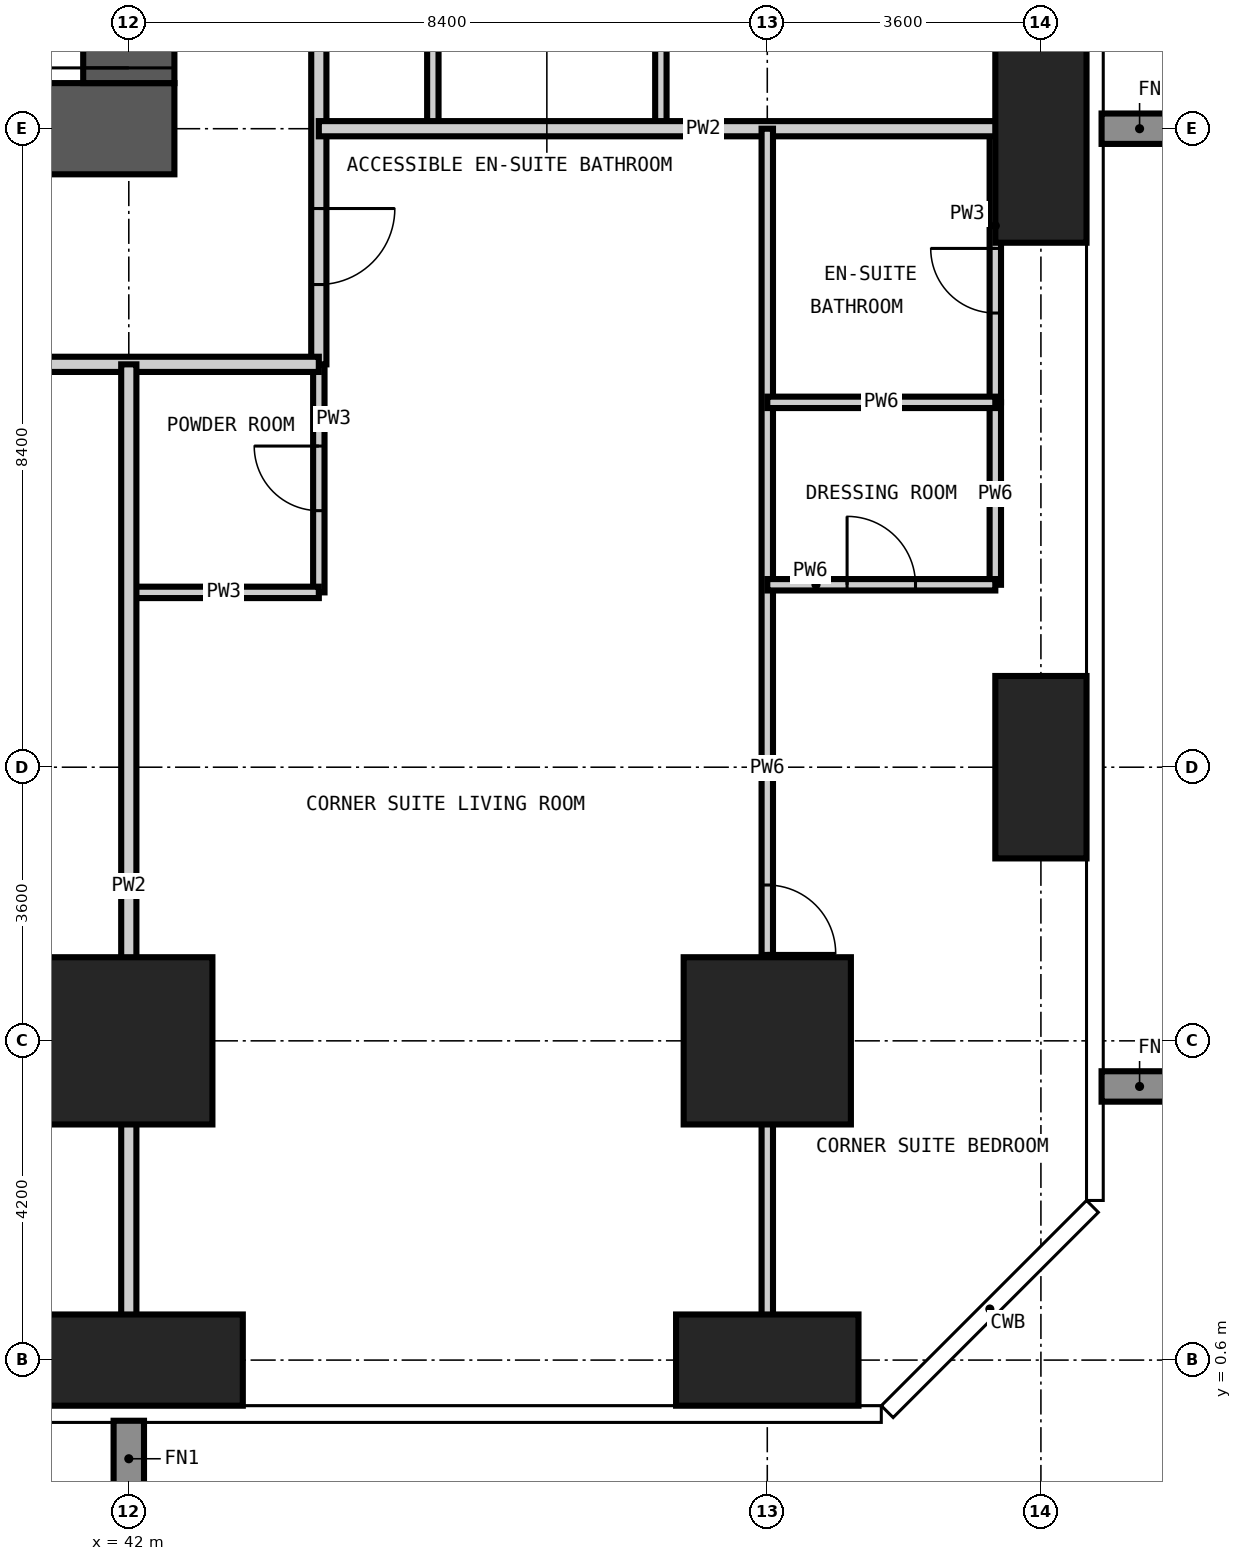
"""IFC4 building model, lengths in metres.
Left out: names, types, materials, properties, quantities, classifications, styles, units other than length and angle.
Written with IfcOpenShell. Run it as: python <this file> out.ifc"""

import sys

from ifc_helpers import new_model, si_unit, direction, frame, frame_2d, origin, origin_2d, place, context, subcontext, project, spatial, rectangle, extrude, element, fill, save


model = new_model("IFC4")
c1 = context("Model", 3, precision=1e-05, world=origin(), true_north=direction((0.0, 1.0)))
c2 = subcontext(c1, "Body", "Model", "MODEL_VIEW")
j1 = project(units=[si_unit("LENGTHUNIT", "METRE"), si_unit("PLANEANGLEUNIT", "RADIAN")], contexts=[c1])
p1 = place(None, origin())
s1 = spatial("IfcSite", under=j1, at=p1, CompositionType="ELEMENT")
p2 = place(p1, origin())
s2 = spatial("IfcBuilding", under=s1, at=p2, CompositionType="ELEMENT")
p3 = place(p2, frame((0.0, 0.0, 97.2)))
s3 = spatial("IfcBuildingStorey", under=s2, at=p3, CompositionType="ELEMENT", Elevation=97.2)
p4 = place(p3, frame((42.0, 0.6, -0.35), z_axis=(0.0, 0.0, 1.0), x_axis=(1.0, 0.0, 0.0)))
e1 = element("IfcColumn", 1, at=p4, inside=s3, PredefinedType="COLUMN", context=c2, shape_type="SweptSolid", body=[
    extrude(rectangle(XDim=3.0, YDim=1.2, at=origin_2d()), origin(), (0.0, 0.0, 1.0), 3.6),
])
p5 = place(p3, frame((42.0, 4.8, -0.35), z_axis=(0.0, 0.0, 1.0), x_axis=(1.0, 0.0, 0.0)))
e2 = element("IfcColumn", 2, at=p5, inside=s3, PredefinedType="COLUMN", context=c2, shape_type="SweptSolid", body=[
    extrude(rectangle(XDim=2.2, YDim=2.2, at=origin_2d()), origin(), (0.0, 0.0, 1.0), 3.6),
])
p6 = place(p3, frame((50.4, 0.6, -0.35), z_axis=(0.0, 0.0, 1.0), x_axis=(1.0, 0.0, 0.0)))
e3 = element("IfcColumn", 3, at=p6, inside=s3, PredefinedType="COLUMN", context=c2, shape_type="SweptSolid", body=[
    extrude(rectangle(XDim=2.4, YDim=1.2, at=origin_2d()), origin(), (0.0, 0.0, 1.0), 3.6),
])
p7 = place(p3, frame((50.4, 4.8, -0.35), z_axis=(0.0, 0.0, 1.0), x_axis=(1.0, 0.0, 0.0)))
e4 = element("IfcColumn", 4, at=p7, inside=s3, PredefinedType="COLUMN", context=c2, shape_type="SweptSolid", body=[
    extrude(rectangle(XDim=2.2, YDim=2.2, at=origin_2d()), origin(), (0.0, 0.0, 1.0), 3.6),
])
p8 = place(p3, frame((54.0, 8.4, -0.35), z_axis=(0.0, 0.0, 1.0), x_axis=(1.0, 0.0, 0.0)))
e5 = element("IfcColumn", 5, at=p8, inside=s3, PredefinedType="COLUMN", context=c2, shape_type="SweptSolid", body=[
    extrude(rectangle(XDim=1.2, YDim=2.4, at=origin_2d()), origin(), (0.0, 0.0, 1.0), 3.6),
])
p9 = place(p3, frame((54.0, 16.8, -0.35), z_axis=(0.0, 0.0, 1.0), x_axis=(1.0, 0.0, 0.0)))
e6 = element("IfcColumn", 6, at=p9, inside=s3, PredefinedType="COLUMN", context=c2, shape_type="SweptSolid", body=[
    extrude(rectangle(XDim=1.2, YDim=3.0, at=origin_2d()), origin(), (0.0, 0.0, 1.0), 3.6),
])
p10 = place(p3, frame((16.2, 16.8, -0.35), z_axis=(0.0, 0.0, 1.0), x_axis=(1.0, 0.0, 0.0)))
e7 = element("IfcWall", 7, at=p10, inside=s3, PredefinedType="SHEAR", context=c2, shape_type="SweptSolid", body=[
    extrude(rectangle(XDim=26.4, YDim=1.2, at=frame_2d((13.2, 0.0))), origin(), (0.0, 0.0, 1.0), 3.6),
])
p11 = place(p10, frame((12.7, 0.0, 0.35)))
e8 = element("IfcOpeningElement", 8, at=p11, cuts=e7, PredefinedType="OPENING", context=c2, shape_type="SweptSolid", body=[
    extrude(rectangle(XDim=1.0, YDim=2.1, at=frame_2d((0.5, 1.05))), frame((0.0, 0.61, 0.0), z_axis=(0.0, -1.0, 0.0), x_axis=(1.0, 0.0, 0.0)), (0.0, 0.0, 1.0), 1.22),
])
p12 = place(p10, frame((19.0, 0.0, 0.35)))
e9 = element("IfcOpeningElement", 9, at=p12, cuts=e7, PredefinedType="OPENING", context=c2, shape_type="SweptSolid", body=[
    extrude(rectangle(XDim=1.0, YDim=2.1, at=frame_2d((0.5, 1.05))), frame((0.0, 0.61, 0.0), z_axis=(0.0, -1.0, 0.0), x_axis=(1.0, 0.0, 0.0)), (0.0, 0.0, 1.0), 1.22),
])
p13 = place(p3, frame((42.0, 17.4, -0.35), z_axis=(0.0, 0.0, 1.0), x_axis=(0.0, 1.0, 0.0)))
e10 = element("IfcWall", 10, at=p13, inside=s3, PredefinedType="SHEAR", context=c2, shape_type="SweptSolid", body=[
    extrude(rectangle(XDim=24.0, YDim=1.2, at=frame_2d((12.0, 0.0))), origin(), (0.0, 0.0, 1.0), 3.6),
])
p14 = place(p13, frame((0.2, 0.0, 0.35)))
e11 = element("IfcOpeningElement", 11, at=p14, cuts=e10, PredefinedType="OPENING", context=c2, shape_type="SweptSolid", body=[
    extrude(rectangle(XDim=1.2, YDim=2.2, at=frame_2d((0.6, 1.1))), frame((0.0, 0.61, 0.0), z_axis=(0.0, -1.0, 0.0), x_axis=(1.0, 0.0, 0.0)), (0.0, 0.0, 1.0), 1.22),
])
p15 = place(p13, frame((11.1, 0.0, 0.35)))
e12 = element("IfcOpeningElement", 12, at=p15, cuts=e10, PredefinedType="OPENING", context=c2, shape_type="SweptSolid", body=[
    extrude(rectangle(XDim=1.8, YDim=2.2, at=frame_2d((0.9, 1.1))), frame((0.0, 0.61, 0.0), z_axis=(0.0, -1.0, 0.0), x_axis=(1.0, 0.0, 0.0)), (0.0, 0.0, 1.0), 1.22),
])
p16 = place(p13, frame((19.9, 0.0, 0.35)))
e13 = element("IfcOpeningElement", 13, at=p16, cuts=e10, PredefinedType="OPENING", context=c2, shape_type="SweptSolid", body=[
    extrude(rectangle(XDim=1.0, YDim=2.1, at=frame_2d((0.5, 1.05))), frame((0.0, 0.61, 0.0), z_axis=(0.0, -1.0, 0.0), x_axis=(1.0, 0.0, 0.0)), (0.0, 0.0, 1.0), 1.22),
])
p17 = place(p3, frame((44.5, 10.7, 0.0), z_axis=(0.0, 0.0, 1.0), x_axis=(0.0, 1.0, 0.0)))
e14 = element("IfcWall", 14, at=p17, inside=s3, PredefinedType="PARTITIONING", context=c2, shape_type="SweptSolid", body=[
    extrude(rectangle(XDim=3.0, YDim=0.15, at=frame_2d((1.5, 0.0))), origin(), (0.0, 0.0, 1.0), 3.25),
])
p18 = place(p17, frame((1.075, 0.0, 0.0)))
e15 = element("IfcOpeningElement", 15, at=p18, cuts=e14, PredefinedType="OPENING", context=c2, shape_type="SweptSolid", body=[
    extrude(rectangle(XDim=0.85, YDim=2.1, at=frame_2d((0.425, 1.05))), frame((0.0, 0.085, 0.0), z_axis=(0.0, -1.0, 0.0), x_axis=(1.0, 0.0, 0.0)), (0.0, 0.0, 1.0), 0.17),
])
for number, where, z_axis, x_axis in (
    (16, (46.0, 16.8, 0.0), (0.0, 0.0, 1.0), (0.0, 1.0, 0.0)),
    (17, (49.0, 16.8, 0.0), (0.0, 0.0, 1.0), (0.0, 1.0, 0.0)),
):
    element("IfcWall", number, at=place(p3, frame(where, z_axis=z_axis, x_axis=x_axis)), inside=s3, PredefinedType="PARTITIONING", context=c2, shape_type="SweptSolid", body=[
        extrude(rectangle(XDim=2.7, YDim=0.15, at=frame_2d((1.35, 0.0))), origin(), (0.0, 0.0, 1.0), 3.25),
    ])
p19 = place(p3, frame((53.4, 13.2, 0.0), z_axis=(0.0, 0.0, 1.0), x_axis=(0.0, 1.0, 0.0)))
e18 = element("IfcWall", 18, at=p19, inside=s3, PredefinedType="PARTITIONING", context=c2, shape_type="SweptSolid", body=[
    extrude(rectangle(XDim=3.6, YDim=0.15, at=frame_2d((1.8, 0.0))), origin(), (0.0, 0.0, 1.0), 3.25),
])
p20 = place(p19, frame((1.175, 0.0, 0.0)))
e19 = element("IfcOpeningElement", 19, at=p20, cuts=e18, PredefinedType="OPENING", context=c2, shape_type="SweptSolid", body=[
    extrude(rectangle(XDim=0.85, YDim=2.1, at=frame_2d((0.425, 1.05))), frame((0.0, 0.085, 0.0), z_axis=(0.0, -1.0, 0.0), x_axis=(1.0, 0.0, 0.0)), (0.0, 0.0, 1.0), 0.17),
])
p21 = place(p3, frame((42.0, 10.7, 0.0), z_axis=(0.0, 0.0, 1.0), x_axis=(1.0, 0.0, 0.0)))
e20 = element("IfcWall", 20, at=p21, inside=s3, PredefinedType="PARTITIONING", context=c2, shape_type="SweptSolid", body=[
    extrude(rectangle(XDim=2.5, YDim=0.15, at=frame_2d((1.25, 0.0))), origin(), (0.0, 0.0, 1.0), 3.25),
])
p22 = place(p3, frame((44.5, 45.7, 0.0), z_axis=(0.0, 0.0, 1.0), x_axis=(0.0, -1.0, 0.0)))
e21 = element("IfcWall", 21, at=p22, inside=s3, PredefinedType="PARTITIONING", context=c2, shape_type="SweptSolid", body=[
    extrude(rectangle(XDim=32.0, YDim=0.2, at=frame_2d((16.0, 0.0))), origin(), (0.0, 0.0, 1.0), 3.25),
])
p23 = place(p22, frame((26.3, 0.0, 0.0)))
e22 = element("IfcOpeningElement", 22, at=p23, cuts=e21, PredefinedType="OPENING", context=c2, shape_type="SweptSolid", body=[
    extrude(rectangle(XDim=1.0, YDim=2.2, at=frame_2d((0.5, 1.1))), frame((0.0, 0.11, 0.0), z_axis=(0.0, -1.0, 0.0), x_axis=(1.0, 0.0, 0.0)), (0.0, 0.0, 1.0), 0.22),
])
p24 = place(p22, frame((20.0, 0.0, 0.0)))
e23 = element("IfcOpeningElement", 23, at=p24, cuts=e21, PredefinedType="OPENING", context=c2, shape_type="SweptSolid", body=[
    extrude(rectangle(XDim=1.0, YDim=2.2, at=frame_2d((0.5, 1.1))), frame((0.0, 0.11, 0.0), z_axis=(0.0, -1.0, 0.0), x_axis=(1.0, 0.0, 0.0)), (0.0, 0.0, 1.0), 0.22),
])
p25 = place(p22, frame((11.6, 0.0, 0.0)))
e24 = element("IfcOpeningElement", 24, at=p25, cuts=e21, PredefinedType="OPENING", context=c2, shape_type="SweptSolid", body=[
    extrude(rectangle(XDim=1.0, YDim=2.2, at=frame_2d((0.5, 1.1))), frame((0.0, 0.11, 0.0), z_axis=(0.0, -1.0, 0.0), x_axis=(1.0, 0.0, 0.0)), (0.0, 0.0, 1.0), 0.22),
])
p26 = place(p22, frame((5.3, 0.0, 0.0)))
e25 = element("IfcOpeningElement", 25, at=p26, cuts=e21, PredefinedType="OPENING", context=c2, shape_type="SweptSolid", body=[
    extrude(rectangle(XDim=1.0, YDim=2.2, at=frame_2d((0.5, 1.1))), frame((0.0, 0.11, 0.0), z_axis=(0.0, -1.0, 0.0), x_axis=(1.0, 0.0, 0.0)), (0.0, 0.0, 1.0), 0.22),
])
p27 = place(p22, frame((29.95, 0.0, 0.0)))
e26 = element("IfcOpeningElement", 26, at=p27, cuts=e21, PredefinedType="OPENING", context=c2, shape_type="SweptSolid", body=[
    extrude(rectangle(XDim=1.0, YDim=2.2, at=frame_2d((0.5, 1.1))), frame((0.0, 0.11, 0.0), z_axis=(0.0, -1.0, 0.0), x_axis=(1.0, 0.0, 0.0)), (0.0, 0.0, 1.0), 0.22),
])
p28 = place(p22, frame((1.35, 0.0, 0.0)))
e27 = element("IfcOpeningElement", 27, at=p28, cuts=e21, PredefinedType="OPENING", context=c2, shape_type="SweptSolid", body=[
    extrude(rectangle(XDim=1.0, YDim=2.2, at=frame_2d((0.5, 1.1))), frame((0.0, 0.11, 0.0), z_axis=(0.0, -1.0, 0.0), x_axis=(1.0, 0.0, 0.0)), (0.0, 0.0, 1.0), 0.22),
])
p29 = place(p3, frame((44.5, 13.7, 0.0), z_axis=(0.0, 0.0, 1.0), x_axis=(-1.0, 0.0, 0.0)))
e28 = element("IfcWall", 28, at=p29, inside=s3, PredefinedType="PARTITIONING", context=c2, shape_type="SweptSolid", body=[
    extrude(rectangle(XDim=31.9, YDim=0.2, at=frame_2d((15.95, 0.0))), origin(), (0.0, 0.0, 1.0), 3.25),
])
p30 = place(p29, frame((23.0, 0.0, 0.0)))
e29 = element("IfcOpeningElement", 29, at=p30, cuts=e28, PredefinedType="OPENING", context=c2, shape_type="SweptSolid", body=[
    extrude(rectangle(XDim=1.0, YDim=2.2, at=frame_2d((0.5, 1.1))), frame((0.0, 0.11, 0.0), z_axis=(0.0, -1.0, 0.0), x_axis=(1.0, 0.0, 0.0)), (0.0, 0.0, 1.0), 0.22),
])
p31 = place(p29, frame((14.6, 0.0, 0.0)))
e30 = element("IfcOpeningElement", 30, at=p31, cuts=e28, PredefinedType="OPENING", context=c2, shape_type="SweptSolid", body=[
    extrude(rectangle(XDim=1.0, YDim=2.2, at=frame_2d((0.5, 1.1))), frame((0.0, 0.11, 0.0), z_axis=(0.0, -1.0, 0.0), x_axis=(1.0, 0.0, 0.0)), (0.0, 0.0, 1.0), 0.22),
])
p32 = place(p29, frame((6.2, 0.0, 0.0)))
e31 = element("IfcOpeningElement", 31, at=p32, cuts=e28, PredefinedType="OPENING", context=c2, shape_type="SweptSolid", body=[
    extrude(rectangle(XDim=1.0, YDim=2.2, at=frame_2d((0.5, 1.1))), frame((0.0, 0.11, 0.0), z_axis=(0.0, -1.0, 0.0), x_axis=(1.0, 0.0, 0.0)), (0.0, 0.0, 1.0), 0.22),
])
p33 = place(p3, frame((42.0, -0.018, 0.0), z_axis=(0.0, 0.0, 1.0), x_axis=(0.0, 1.0, 0.0)))
e32 = element("IfcWall", 32, at=p33, inside=s3, PredefinedType="PARTITIONING", context=c2, shape_type="SweptSolid", body=[
    extrude(rectangle(XDim=13.718, YDim=0.2, at=frame_2d((6.859, 0.0))), origin(), (0.0, 0.0, 1.0), 3.25),
])
p34 = place(p3, frame((44.5, 16.8, 0.0), z_axis=(0.0, 0.0, 1.0), x_axis=(1.0, 0.0, 0.0)))
e33 = element("IfcWall", 33, at=p34, inside=s3, PredefinedType="PARTITIONING", context=c2, shape_type="SweptSolid", body=[
    extrude(rectangle(XDim=10.118, YDim=0.2, at=frame_2d((5.059, 0.0))), origin(), (0.0, 0.0, 1.0), 3.25),
])
p35 = place(p3, frame((50.4, -0.018, 0.0), z_axis=(0.0, 0.0, 1.0), x_axis=(0.0, 1.0, 0.0)))
e34 = element("IfcWall", 34, at=p35, inside=s3, PredefinedType="PARTITIONING", context=c2, shape_type="SweptSolid", body=[
    extrude(rectangle(XDim=16.818, YDim=0.15, at=frame_2d((8.409, 0.0))), origin(), (0.0, 0.0, 1.0), 3.25),
])
p36 = place(p35, frame((5.968, 0.0, 0.0)))
e35 = element("IfcOpeningElement", 35, at=p36, cuts=e34, PredefinedType="OPENING", context=c2, shape_type="SweptSolid", body=[
    extrude(rectangle(XDim=0.9, YDim=2.1, at=frame_2d((0.45, 1.05))), frame((0.0, 0.085, 0.0), z_axis=(0.0, -1.0, 0.0), x_axis=(1.0, 0.0, 0.0)), (0.0, 0.0, 1.0), 0.17),
])
p37 = place(p3, frame((53.4, 10.8, 0.0), z_axis=(0.0, 0.0, 1.0), x_axis=(0.0, 1.0, 0.0)))
e36 = element("IfcWall", 36, at=p37, inside=s3, PredefinedType="PARTITIONING", context=c2, shape_type="SweptSolid", body=[
    extrude(rectangle(XDim=2.4, YDim=0.15, at=frame_2d((1.2, 0.0))), origin(), (0.0, 0.0, 1.0), 3.25),
])
p38 = place(p3, frame((50.4, 10.8, 0.0), z_axis=(0.0, 0.0, 1.0), x_axis=(1.0, 0.0, 0.0)))
e37 = element("IfcWall", 37, at=p38, inside=s3, PredefinedType="PARTITIONING", context=c2, shape_type="SweptSolid", body=[
    extrude(rectangle(XDim=3.0, YDim=0.15, at=frame_2d((1.5, 0.0))), origin(), (0.0, 0.0, 1.0), 3.25),
])
p39 = place(p38, frame((1.05, 0.0, 0.0)))
e38 = element("IfcOpeningElement", 38, at=p39, cuts=e37, PredefinedType="OPENING", context=c2, shape_type="SweptSolid", body=[
    extrude(rectangle(XDim=0.9, YDim=2.1, at=frame_2d((0.45, 1.05))), frame((0.0, 0.085, 0.0), z_axis=(0.0, -1.0, 0.0), x_axis=(1.0, 0.0, 0.0)), (0.0, 0.0, 1.0), 0.17),
])
p40 = place(p3, frame((50.4, 13.2, 0.0), z_axis=(0.0, 0.0, 1.0), x_axis=(1.0, 0.0, 0.0)))
e39 = element("IfcWall", 39, at=p40, inside=s3, PredefinedType="PARTITIONING", context=c2, shape_type="SweptSolid", body=[
    extrude(rectangle(XDim=3.0, YDim=0.15, at=frame_2d((1.5, 0.0))), origin(), (0.0, 0.0, 1.0), 3.25),
])
p41 = place(p14, origin())
e40 = element("IfcDoor", 40, at=p41, inside=s3, OperationType="SINGLE_SWING_LEFT", PredefinedType="DOOR", context=c2, shape_type="SweptSolid", body=[
    extrude(rectangle(XDim=1.2, YDim=2.2, at=frame_2d((0.6, 1.1))), frame((0.0, 0.025, 0.0), z_axis=(0.0, -1.0, 0.0), x_axis=(1.0, 0.0, 0.0)), (0.0, 0.0, 1.0), 0.05),
])
fill(e11, e40)
p42 = place(p27, origin())
e41 = element("IfcDoor", 41, at=p42, inside=s3, OperationType="SINGLE_SWING_LEFT", PredefinedType="DOOR", context=c2, shape_type="SweptSolid", body=[
    extrude(rectangle(XDim=1.0, YDim=2.2, at=frame_2d((0.5, 1.1))), frame((0.0, 0.025, 0.0), z_axis=(0.0, -1.0, 0.0), x_axis=(1.0, 0.0, 0.0)), (0.0, 0.0, 1.0), 0.05),
])
fill(e26, e41)
p43 = place(p18, origin())
e42 = element("IfcDoor", 42, at=p43, inside=s3, OperationType="SINGLE_SWING_RIGHT", PredefinedType="DOOR", context=c2, shape_type="SweptSolid", body=[
    extrude(rectangle(XDim=0.85, YDim=2.1, at=frame_2d((0.425, 1.05))), frame((0.0, 0.025, 0.0), z_axis=(0.0, -1.0, 0.0), x_axis=(1.0, 0.0, 0.0)), (0.0, 0.0, 1.0), 0.05),
])
fill(e15, e42)
p44 = place(p36, frame((0.9, 0.0, 0.0), z_axis=(0.0, 0.0, 1.0), x_axis=(-1.0, 0.0, 0.0)))
e43 = element("IfcDoor", 43, at=p44, inside=s3, OperationType="SINGLE_SWING_RIGHT", PredefinedType="DOOR", context=c2, shape_type="SweptSolid", body=[
    extrude(rectangle(XDim=0.9, YDim=2.1, at=frame_2d((0.45, 1.05))), frame((0.0, 0.025, 0.0), z_axis=(0.0, -1.0, 0.0), x_axis=(1.0, 0.0, 0.0)), (0.0, 0.0, 1.0), 0.05),
])
fill(e35, e43)
p45 = place(p20, origin())
e44 = element("IfcDoor", 44, at=p45, inside=s3, OperationType="SINGLE_SWING_RIGHT", PredefinedType="DOOR", context=c2, shape_type="SweptSolid", body=[
    extrude(rectangle(XDim=0.85, YDim=2.1, at=frame_2d((0.425, 1.05))), frame((0.0, 0.025, 0.0), z_axis=(0.0, -1.0, 0.0), x_axis=(1.0, 0.0, 0.0)), (0.0, 0.0, 1.0), 0.05),
])
fill(e19, e44)
p46 = place(p39, origin())
e45 = element("IfcDoor", 45, at=p46, inside=s3, OperationType="SINGLE_SWING_LEFT", PredefinedType="DOOR", context=c2, shape_type="SweptSolid", body=[
    extrude(rectangle(XDim=0.9, YDim=2.1, at=frame_2d((0.45, 1.05))), frame((0.0, 0.025, 0.0), z_axis=(0.0, -1.0, 0.0), x_axis=(1.0, 0.0, 0.0)), (0.0, 0.0, 1.0), 0.05),
])
fill(e38, e45)
save(model, sys.argv[1])
